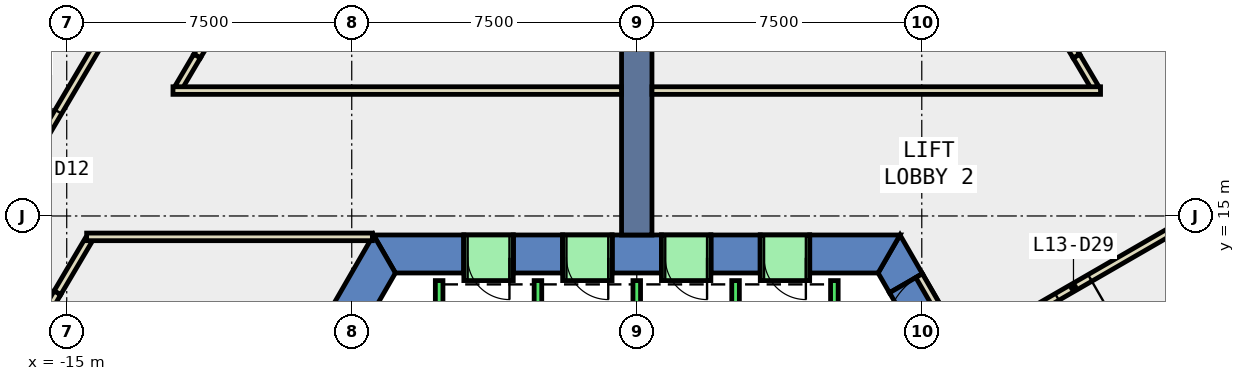
"""IFC4 building model, lengths in metres.
Left out: names, types, materials, properties, quantities, classifications, styles, units other than length and angle.
Written with IfcOpenShell. Run it as: python <this file> out.ifc"""

import sys

from ifc_helpers import new_model, si_unit, direction, frame, frame_2d, origin, place, context, subcontext, project, spatial, polyline, rectangle, outline, extrude, element, fill, save


model = new_model("IFC4")
c1 = context("Model", 3, precision=1e-05, world=origin(), true_north=direction((0.0, 1.0)))
c2 = subcontext(c1, "Body", "Model", "MODEL_VIEW")
j1 = project(units=[si_unit("LENGTHUNIT", "METRE"), si_unit("PLANEANGLEUNIT", "RADIAN")], contexts=[c1])
p1 = place(None, origin())
s1 = spatial("IfcSite", under=j1, at=p1, CompositionType="ELEMENT")
p2 = place(p1, origin())
s2 = spatial("IfcBuilding", under=s1, at=p2, CompositionType="ELEMENT")
p3 = place(p2, frame((0.0, 0.0, 64.4)))
s3 = spatial("IfcBuildingStorey", under=s2, at=p3, CompositionType="ELEMENT", Elevation=64.4)
p4 = place(p3, frame((0.0, 0.0, -0.4)))
e1 = element("IfcWall", 1, at=p4, inside=s3, PredefinedType="SHEAR", context=c2, shape_type="SweptSolid", body=[
    extrude(outline(polyline([(6.651, 12.98), (7.517, 13.48), (6.928, 14.5), (6.351, 13.5), (6.651, 12.98)])), origin(), (0.0, 0.0, 1.0), 4.2),
])
p5 = place(p3, frame((0.0, 0.0, 3.6)))
e2 = element("IfcWall", 2, at=p5, inside=s3, PredefinedType="SHEAR", context=c2, shape_type="SweptSolid", body=[
    extrude(outline(polyline([(7.517, 13.48), (6.651, 12.98), (7.651, 11.248), (8.517, 11.748), (7.517, 13.48)])), origin(), (0.0, 0.0, 1.0), 0.2),
])
p6 = place(p3, frame((0.0, 0.0, -0.4)))
e3 = element("IfcWall", 3, at=p6, inside=s3, PredefinedType="SHEAR", context=c2, shape_type="SweptSolid", body=[
    extrude(outline(polyline([(4.55, 14.5), (4.55, 13.5), (6.351, 13.5), (6.928, 14.5), (4.55, 14.5)])), origin(), (0.0, 0.0, 1.0), 4.2),
])
p7 = place(p3, frame((0.0, 0.0, -0.4)))
e4 = element("IfcWall", 4, at=p7, inside=s3, PredefinedType="SHEAR", context=c2, shape_type="SweptSolid", body=[
    extrude(outline(polyline([(1.95, 14.5), (1.95, 13.5), (3.25, 13.5), (3.25, 14.5), (1.95, 14.5)])), origin(), (0.0, 0.0, 1.0), 4.2),
])
p8 = place(p3, frame((0.0, 0.0, -0.4)))
e5 = element("IfcWall", 5, at=p8, inside=s3, PredefinedType="SHEAR", context=c2, shape_type="SweptSolid", body=[
    extrude(outline(polyline([(-0.65, 14.5), (-0.65, 13.5), (0.65, 13.5), (0.65, 14.5), (-0.65, 14.5)])), origin(), (0.0, 0.0, 1.0), 4.2),
])
p9 = place(p3, frame((0.0, 0.0, -0.4)))
e6 = element("IfcWall", 6, at=p9, inside=s3, PredefinedType="SHEAR", context=c2, shape_type="SweptSolid", body=[
    extrude(outline(polyline([(-3.25, 14.5), (-3.25, 13.5), (-1.95, 13.5), (-1.95, 14.5), (-3.25, 14.5)])), origin(), (0.0, 0.0, 1.0), 4.2),
])
p10 = place(p3, frame((0.0, 0.0, -0.4)))
e7 = element("IfcWall", 7, at=p10, inside=s3, PredefinedType="SHEAR", context=c2, shape_type="SweptSolid", body=[
    extrude(outline(polyline([(-4.55, 13.5), (-4.55, 14.5), (-6.928, 14.5), (-6.351, 13.5), (-4.55, 13.5)])), origin(), (0.0, 0.0, 1.0), 4.2),
])
p11 = place(p3, frame((0.0, 0.0, 3.6)))
e8 = element("IfcWall", 8, at=p11, inside=s3, PredefinedType="SHEAR", context=c2, shape_type="SweptSolid", body=[
    extrude(outline(polyline([(3.25, 14.5), (3.25, 13.5), (4.55, 13.5), (4.55, 14.5), (3.25, 14.5)])), origin(), (0.0, 0.0, 1.0), 0.2),
])
p12 = place(p3, frame((0.0, 0.0, 3.6)))
e9 = element("IfcWall", 9, at=p12, inside=s3, PredefinedType="SHEAR", context=c2, shape_type="SweptSolid", body=[
    extrude(outline(polyline([(0.65, 14.5), (0.65, 13.5), (1.95, 13.5), (1.95, 14.5), (0.65, 14.5)])), origin(), (0.0, 0.0, 1.0), 0.2),
])
p13 = place(p3, frame((0.0, 0.0, 3.6)))
e10 = element("IfcWall", 10, at=p13, inside=s3, PredefinedType="SHEAR", context=c2, shape_type="SweptSolid", body=[
    extrude(outline(polyline([(-1.95, 14.5), (-1.95, 13.5), (-0.65, 13.5), (-0.65, 14.5), (-1.95, 14.5)])), origin(), (0.0, 0.0, 1.0), 0.2),
])
p14 = place(p3, frame((0.0, 0.0, 3.6)))
e11 = element("IfcWall", 11, at=p14, inside=s3, PredefinedType="SHEAR", context=c2, shape_type="SweptSolid", body=[
    extrude(outline(polyline([(-4.55, 14.5), (-4.55, 13.5), (-3.25, 13.5), (-3.25, 14.5), (-4.55, 14.5)])), origin(), (0.0, 0.0, 1.0), 0.2),
])
p15 = place(p3, frame((0.0, 0.0, -0.4)))
e12 = element("IfcWall", 12, at=p15, inside=s3, PredefinedType="SHEAR", context=c2, shape_type="SweptSolid", body=[
    extrude(outline(polyline([(-12.267, 5.252), (-11.402, 4.752), (-6.351, 13.5), (-6.928, 14.5), (-12.267, 5.252)])), origin(), (0.0, 0.0, 1.0), 4.2),
])
p16 = place(p3, frame((0.0, 14.5, -0.4), z_axis=(0.0, 0.0, 1.0), x_axis=(0.0, 1.0, 0.0)))
e13 = element("IfcWall", 13, at=p16, inside=s3, PredefinedType="SHEAR", context=c2, shape_type="SweptSolid", body=[
    extrude(rectangle(XDim=9.0, YDim=0.8, at=frame_2d((4.5, 0.0))), origin(), (0.0, 0.0, 1.0), 4.2),
])
p17 = place(p3, frame((-14.427, 14.364, 0.0), z_axis=(0.0, 0.0, 1.0), x_axis=(-0.508509719672, -0.861056249614, 0.0)))
e14 = element("IfcWall", 14, at=p17, inside=s3, PredefinedType="PARTITIONING", context=c2, shape_type="SweptSolid", body=[
    extrude(rectangle(XDim=1.611, YDim=0.2, at=frame_2d((0.805, 0.0))), origin(), (0.0, 0.0, 1.0), 3.8),
])
p18 = place(p3, frame((-15.246, 12.977, 0.0), z_axis=(0.0, 0.0, 1.0), x_axis=(-0.499891203561, -0.866088208327, 0.0)))
e15 = element("IfcWall", 15, at=p18, inside=s3, PredefinedType="PARTITIONING", context=c2, shape_type="SweptSolid", body=[
    extrude(rectangle(XDim=4.801, YDim=0.2, at=frame_2d((2.4, 0.0))), origin(), (0.0, 0.0, 1.0), 3.8),
])
p19 = place(p3, frame((14.316, 14.75, 0.0), z_axis=(0.0, 0.0, 1.0), x_axis=(-0.865981716183, -0.500075661512, 0.0)))
e16 = element("IfcWall", 16, at=p19, inside=s3, PredefinedType="PARTITIONING", context=c2, shape_type="SweptSolid", body=[
    extrude(rectangle(XDim=6.023, YDim=0.2, at=frame_2d((3.011, 0.0))), origin(), (0.0, 0.0, 1.0), 3.8),
])
p20 = place(p19, frame((2.761, 0.0, 0.0)))
e17 = element("IfcOpeningElement", 17, at=p20, cuts=e16, PredefinedType="OPENING", context=c2, shape_type="SweptSolid", body=[
    extrude(rectangle(XDim=1.0, YDim=2.1, at=frame_2d((0.5, 1.05))), frame((0.0, 0.11, 0.0), z_axis=(0.0, -1.0, 0.0), x_axis=(1.0, 0.0, 0.0)), (0.0, 0.0, 1.0), 0.22),
])
p21 = place(p3, frame((12.054, 18.386, 0.0), z_axis=(0.0, 0.0, 1.0), x_axis=(-0.508048285953, 0.861328589529, 0.0)))
e18 = element("IfcWall", 18, at=p21, inside=s3, PredefinedType="PARTITIONING", context=c2, shape_type="SweptSolid", body=[
    extrude(rectangle(XDim=0.954, YDim=0.2, at=frame_2d((0.477, 0.0))), origin(), (0.0, 0.0, 1.0), 3.8),
])
p22 = place(p3, frame((11.569, 19.208, 0.0), z_axis=(0.0, 0.0, 1.0), x_axis=(-0.516172233954, 0.85648480716, 0.0)))
e19 = element("IfcWall", 19, at=p22, inside=s3, PredefinedType="PARTITIONING", context=c2, shape_type="SweptSolid", body=[
    extrude(rectangle(XDim=7.234, YDim=0.2, at=frame_2d((3.617, 0.0))), origin(), (0.0, 0.0, 1.0), 3.8),
])
p23 = place(p22, frame((2.717, 0.0, 0.0)))
e20 = element("IfcOpeningElement", 20, at=p23, cuts=e19, PredefinedType="OPENING", context=c2, shape_type="SweptSolid", body=[
    extrude(rectangle(XDim=1.8, YDim=2.1, at=frame_2d((0.9, 1.05))), frame((0.0, 0.11, 0.0), z_axis=(0.0, -1.0, 0.0), x_axis=(1.0, 0.0, 0.0)), (0.0, 0.0, 1.0), 0.22),
])
p24 = place(p3, frame((-7.835, 25.404, 0.0), z_axis=(0.0, 0.0, 1.0), x_axis=(-0.516172233954, -0.85648480716, 0.0)))
e21 = element("IfcWall", 21, at=p24, inside=s3, PredefinedType="PARTITIONING", context=c2, shape_type="SweptSolid", body=[
    extrude(rectangle(XDim=7.234, YDim=0.2, at=frame_2d((3.617, 0.0))), origin(), (0.0, 0.0, 1.0), 3.8),
])
p25 = place(p3, frame((-11.569, 19.208, 0.0), z_axis=(0.0, 0.0, 1.0), x_axis=(-0.508048285953, -0.861328589529, 0.0)))
e22 = element("IfcWall", 22, at=p25, inside=s3, PredefinedType="PARTITIONING", context=c2, shape_type="SweptSolid", body=[
    extrude(rectangle(XDim=0.954, YDim=0.2, at=frame_2d((0.477, 0.0))), origin(), (0.0, 0.0, 1.0), 3.8),
])
p26 = place(p3, frame((13.63, 20.437, 0.0), z_axis=(0.0, 0.0, 1.0), x_axis=(0.508298695021, -0.861180838523, 0.0)))
e23 = element("IfcWall", 23, at=p26, inside=s3, PredefinedType="PARTITIONING", context=c2, shape_type="SweptSolid", body=[
    extrude(rectangle(XDim=3.553, YDim=0.2, at=frame_2d((1.777, 0.0))), origin(), (0.0, 0.0, 1.0), 3.8),
])
p27 = place(p3, frame((-17.357, 14.122, 0.0), z_axis=(0.0, 0.0, 1.0), x_axis=(0.508298575594, 0.861180909014, 0.0)))
e24 = element("IfcWall", 24, at=p27, inside=s3, PredefinedType="PARTITIONING", context=c2, shape_type="SweptSolid", body=[
    extrude(rectangle(XDim=7.258, YDim=0.2, at=frame_2d((3.629, 0.0))), origin(), (0.0, 0.0, 1.0), 3.8),
])
p28 = place(p27, frame((3.204, 0.0, 0.0)))
e25 = element("IfcOpeningElement", 25, at=p28, cuts=e24, PredefinedType="OPENING", context=c2, shape_type="SweptSolid", body=[
    extrude(rectangle(XDim=1.0, YDim=2.1, at=frame_2d((0.5, 1.05))), frame((0.0, 0.11, 0.0), z_axis=(0.0, -1.0, 0.0), x_axis=(1.0, 0.0, 0.0)), (0.0, 0.0, 1.0), 0.22),
])
p29 = place(p3, frame((-6.957, 14.45, 0.0), z_axis=(0.0, 0.0, 1.0), x_axis=(-1.0, 0.0, 0.0)))
e26 = element("IfcWall", 26, at=p29, inside=s3, PredefinedType="PARTITIONING", context=c2, shape_type="SweptSolid", body=[
    extrude(rectangle(XDim=7.519, YDim=0.2, at=frame_2d((3.76, 0.0))), origin(), (0.0, 0.0, 1.0), 3.8),
])
p30 = place(p3, frame((-12.204, 18.3, 0.0), z_axis=(0.0, 0.0, 1.0), x_axis=(1.0, 0.0, 0.0)))
e27 = element("IfcWall", 27, at=p30, inside=s3, PredefinedType="PARTITIONING", context=c2, shape_type="SweptSolid", body=[
    extrude(rectangle(XDim=11.804, YDim=0.2, at=frame_2d((5.902, 0.0))), origin(), (0.0, 0.0, 1.0), 3.8),
])
p31 = place(p3, frame((8.43, 11.698, 0.0), z_axis=(0.0, 0.0, 1.0), x_axis=(-0.50002537861, 0.866010750942, 0.0)))
e28 = element("IfcWall", 28, at=p31, inside=s3, PredefinedType="PARTITIONING", context=c2, shape_type="SweptSolid", body=[
    extrude(rectangle(XDim=2.0, YDim=0.2, at=frame_2d((1.0, 0.0))), origin(), (0.0, 0.0, 1.0), 2.4),
])
p32 = place(p31, frame((0.19, 0.0, 0.0)))
e29 = element("IfcOpeningElement", 29, at=p32, cuts=e28, PredefinedType="OPENING", context=c2, shape_type="SweptSolid", body=[
    extrude(rectangle(XDim=1.8, YDim=2.1, at=frame_2d((0.9, 1.05))), frame((0.0, 0.11, 0.0), z_axis=(0.0, -1.0, 0.0), x_axis=(1.0, 0.0, 0.0)), (0.0, 0.0, 1.0), 0.22),
])
p33 = place(p3, frame((0.4, 18.3, 0.0), z_axis=(0.0, 0.0, 1.0), x_axis=(1.0, 0.0, 0.0)))
e30 = element("IfcWall", 30, at=p33, inside=s3, PredefinedType="PARTITIONING", context=c2, shape_type="SweptSolid", body=[
    extrude(rectangle(XDim=11.804, YDim=0.2, at=frame_2d((5.902, 0.0))), origin(), (0.0, 0.0, 1.0), 3.8),
])
for number, where, z_axis, x_axis in (
    (31, (5.2, 10.8, 0.0), (0.0, 0.0, 1.0), (0.0, 1.0, 0.0)),
    (32, (2.6, 10.8, 0.0), (0.0, 0.0, 1.0), (0.0, 1.0, 0.0)),
    (33, (0.0, 10.8, 0.0), (0.0, 0.0, 1.0), (0.0, 1.0, 0.0)),
    (34, (-2.6, 10.8, 0.0), (0.0, 0.0, 1.0), (0.0, 1.0, 0.0)),
    (35, (-5.2, 10.8, 0.0), (0.0, 0.0, 1.0), (0.0, 1.0, 0.0)),
):
    element("IfcWall", number, at=place(p3, frame(where, z_axis=z_axis, x_axis=x_axis)), inside=s3, PredefinedType="STANDARD", context=c2, shape_type="SweptSolid", body=[
        extrude(rectangle(XDim=2.5, YDim=0.2, at=frame_2d((1.25, 0.0))), origin(), (0.0, 0.0, 1.0), 3.8),
    ])
p34 = place(p3, frame((4.55, 13.9, 0.0), z_axis=(0.0, 0.0, 1.0), x_axis=(-1.0, 0.0, 0.0)))
e36 = element("IfcWall", 36, at=p34, inside=s3, PredefinedType="STANDARD", context=c2, shape_type="SweptSolid", body=[
    extrude(rectangle(XDim=1.3, YDim=1.2, at=frame_2d((0.65, 0.0))), origin(), (0.0, 0.0, 1.0), 2.4),
])
p35 = place(p34, frame((0.1, 0.0, 0.0)))
e37 = element("IfcOpeningElement", 37, at=p35, cuts=e36, PredefinedType="OPENING", context=c2, shape_type="SweptSolid", body=[
    extrude(rectangle(XDim=1.1, YDim=2.3, at=frame_2d((0.55, 1.15))), frame((0.0, 0.61, 0.0), z_axis=(0.0, -1.0, 0.0), x_axis=(1.0, 0.0, 0.0)), (0.0, 0.0, 1.0), 1.22),
])
p36 = place(p3, frame((1.95, 13.9, 0.0), z_axis=(0.0, 0.0, 1.0), x_axis=(-1.0, 0.0, 0.0)))
e38 = element("IfcWall", 38, at=p36, inside=s3, PredefinedType="STANDARD", context=c2, shape_type="SweptSolid", body=[
    extrude(rectangle(XDim=1.3, YDim=1.2, at=frame_2d((0.65, 0.0))), origin(), (0.0, 0.0, 1.0), 2.4),
])
p37 = place(p36, frame((0.1, 0.0, 0.0)))
e39 = element("IfcOpeningElement", 39, at=p37, cuts=e38, PredefinedType="OPENING", context=c2, shape_type="SweptSolid", body=[
    extrude(rectangle(XDim=1.1, YDim=2.3, at=frame_2d((0.55, 1.15))), frame((0.0, 0.61, 0.0), z_axis=(0.0, -1.0, 0.0), x_axis=(1.0, 0.0, 0.0)), (0.0, 0.0, 1.0), 1.22),
])
p38 = place(p3, frame((-0.65, 13.9, 0.0), z_axis=(0.0, 0.0, 1.0), x_axis=(-1.0, 0.0, 0.0)))
e40 = element("IfcWall", 40, at=p38, inside=s3, PredefinedType="STANDARD", context=c2, shape_type="SweptSolid", body=[
    extrude(rectangle(XDim=1.3, YDim=1.2, at=frame_2d((0.65, 0.0))), origin(), (0.0, 0.0, 1.0), 2.4),
])
p39 = place(p38, frame((0.1, 0.0, 0.0)))
e41 = element("IfcOpeningElement", 41, at=p39, cuts=e40, PredefinedType="OPENING", context=c2, shape_type="SweptSolid", body=[
    extrude(rectangle(XDim=1.1, YDim=2.3, at=frame_2d((0.55, 1.15))), frame((0.0, 0.61, 0.0), z_axis=(0.0, -1.0, 0.0), x_axis=(1.0, 0.0, 0.0)), (0.0, 0.0, 1.0), 1.22),
])
p40 = place(p3, frame((-3.25, 13.9, 0.0), z_axis=(0.0, 0.0, 1.0), x_axis=(-1.0, 0.0, 0.0)))
e42 = element("IfcWall", 42, at=p40, inside=s3, PredefinedType="STANDARD", context=c2, shape_type="SweptSolid", body=[
    extrude(rectangle(XDim=1.3, YDim=1.2, at=frame_2d((0.65, 0.0))), origin(), (0.0, 0.0, 1.0), 2.4),
])
p41 = place(p40, frame((0.1, 0.0, 0.0)))
e43 = element("IfcOpeningElement", 43, at=p41, cuts=e42, PredefinedType="OPENING", context=c2, shape_type="SweptSolid", body=[
    extrude(rectangle(XDim=1.1, YDim=2.3, at=frame_2d((0.55, 1.15))), frame((0.0, 0.61, 0.0), z_axis=(0.0, -1.0, 0.0), x_axis=(1.0, 0.0, 0.0)), (0.0, 0.0, 1.0), 1.22),
])
p42 = place(p28, origin())
e44 = element("IfcDoor", 44, at=p42, inside=s3, OperationType="SINGLE_SWING_RIGHT", PredefinedType="DOOR", context=c2, shape_type="SweptSolid", body=[
    extrude(rectangle(XDim=1.0, YDim=2.1, at=frame_2d((0.5, 1.05))), frame((0.0, 0.025, 0.0), z_axis=(0.0, -1.0, 0.0), x_axis=(1.0, 0.0, 0.0)), (0.0, 0.0, 1.0), 0.05),
])
fill(e25, e44)
p43 = place(p20, origin())
e45 = element("IfcDoor", 45, at=p43, inside=s3, OperationType="SINGLE_SWING_LEFT", PredefinedType="DOOR", context=c2, shape_type="SweptSolid", body=[
    extrude(rectangle(XDim=1.0, YDim=2.1, at=frame_2d((0.5, 1.05))), frame((0.0, 0.025, 0.0), z_axis=(0.0, -1.0, 0.0), x_axis=(1.0, 0.0, 0.0)), (0.0, 0.0, 1.0), 0.05),
])
fill(e17, e45)
p44 = place(p32, origin())
e46 = element("IfcDoor", 46, at=p44, inside=s3, OperationType="DOUBLE_DOOR_SINGLE_SWING", PredefinedType="DOOR", context=c2, shape_type="SweptSolid", body=[
    extrude(rectangle(XDim=1.8, YDim=2.1, at=frame_2d((0.9, 1.05))), frame((0.0, 0.025, 0.0), z_axis=(0.0, -1.0, 0.0), x_axis=(1.0, 0.0, 0.0)), (0.0, 0.0, 1.0), 0.05),
])
fill(e29, e46)
p45 = place(p35, origin())
e47 = element("IfcDoor", 47, at=p45, inside=s3, OperationType="SLIDING_TO_LEFT", PredefinedType="DOOR", context=c2, shape_type="SweptSolid", body=[
    extrude(rectangle(XDim=1.1, YDim=2.3, at=frame_2d((0.55, 1.15))), frame((0.0, 0.025, 0.0), z_axis=(0.0, -1.0, 0.0), x_axis=(1.0, 0.0, 0.0)), (0.0, 0.0, 1.0), 0.05),
])
fill(e37, e47)
p46 = place(p37, origin())
e48 = element("IfcDoor", 48, at=p46, inside=s3, OperationType="SLIDING_TO_LEFT", PredefinedType="DOOR", context=c2, shape_type="SweptSolid", body=[
    extrude(rectangle(XDim=1.1, YDim=2.3, at=frame_2d((0.55, 1.15))), frame((0.0, 0.025, 0.0), z_axis=(0.0, -1.0, 0.0), x_axis=(1.0, 0.0, 0.0)), (0.0, 0.0, 1.0), 0.05),
])
fill(e39, e48)
p47 = place(p39, origin())
e49 = element("IfcDoor", 49, at=p47, inside=s3, OperationType="SLIDING_TO_LEFT", PredefinedType="DOOR", context=c2, shape_type="SweptSolid", body=[
    extrude(rectangle(XDim=1.1, YDim=2.3, at=frame_2d((0.55, 1.15))), frame((0.0, 0.025, 0.0), z_axis=(0.0, -1.0, 0.0), x_axis=(1.0, 0.0, 0.0)), (0.0, 0.0, 1.0), 0.05),
])
fill(e41, e49)
p48 = place(p41, origin())
e50 = element("IfcDoor", 50, at=p48, inside=s3, OperationType="SLIDING_TO_LEFT", PredefinedType="DOOR", context=c2, shape_type="SweptSolid", body=[
    extrude(rectangle(XDim=1.1, YDim=2.3, at=frame_2d((0.55, 1.15))), frame((0.0, 0.025, 0.0), z_axis=(0.0, -1.0, 0.0), x_axis=(1.0, 0.0, 0.0)), (0.0, 0.0, 1.0), 0.05),
])
fill(e43, e50)
save(model, sys.argv[1])
